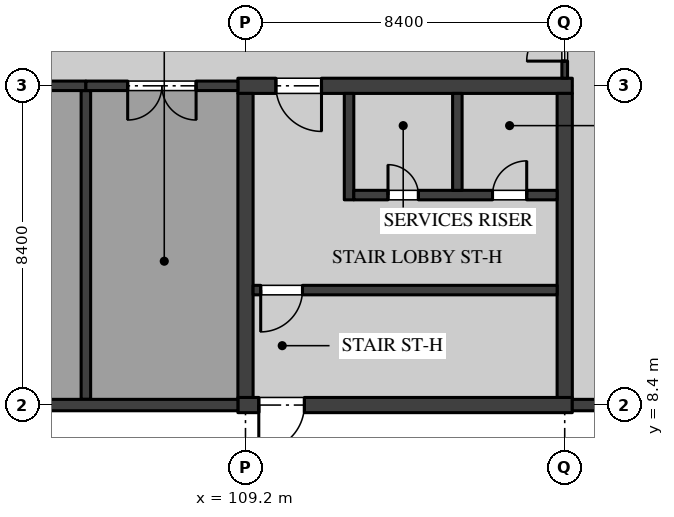
"""IFC4 building model, lengths in metres.
Left out: names, types, materials, properties, quantities, classifications, styles, units other than length and angle.
Written with IfcOpenShell. Run it as: python <this file> out.ifc"""

import sys

from ifc_helpers import new_model, si_unit, direction, frame, frame_2d, origin, place, context, subcontext, project, spatial, rectangle, extrude, element, fill, save


model = new_model("IFC4")
c1 = context("Model", 3, precision=1e-05, world=origin(), true_north=direction((0.0, 1.0)))
c2 = subcontext(c1, "Body", "Model", "MODEL_VIEW")
j1 = project(units=[si_unit("LENGTHUNIT", "METRE"), si_unit("PLANEANGLEUNIT", "RADIAN")], contexts=[c1])
p1 = place(None, origin())
s1 = spatial("IfcSite", under=j1, at=p1, CompositionType="ELEMENT")
p2 = place(p1, origin())
s2 = spatial("IfcBuilding", under=s1, at=p2, CompositionType="ELEMENT")
p3 = place(p2, origin())
s3 = spatial("IfcBuildingStorey", under=s2, at=p3, CompositionType="ELEMENT", Elevation=0.0)
p4 = place(p3, frame((109.0, 8.4, 0.0), z_axis=(0.0, 0.0, 1.0), x_axis=(1.0, 0.0, 0.0)))
e1 = element("IfcWall", 1, at=p4, inside=s3, PredefinedType="SHEAR", context=c2, shape_type="SweptSolid", body=[
    extrude(rectangle(XDim=8.8, YDim=0.4, at=frame_2d((4.4, 0.0))), origin(), (0.0, 0.0, 1.0), 5.05),
])
p5 = place(p4, frame((0.55, 0.0, 0.0)))
e2 = element("IfcOpeningElement", 2, at=p5, cuts=e1, PredefinedType="OPENING", context=c2, shape_type="SweptSolid", body=[
    extrude(rectangle(XDim=1.2, YDim=2.1, at=frame_2d((0.6, 1.05))), frame((0.0, 0.21, 0.0), z_axis=(0.0, -1.0, 0.0), x_axis=(1.0, 0.0, 0.0)), (0.0, 0.0, 1.0), 0.42),
])
p6 = place(p3, frame((109.0, 16.8, 0.0), z_axis=(0.0, 0.0, 1.0), x_axis=(1.0, 0.0, 0.0)))
e3 = element("IfcWall", 3, at=p6, inside=s3, PredefinedType="SHEAR", context=c2, shape_type="SweptSolid", body=[
    extrude(rectangle(XDim=8.8, YDim=0.4, at=frame_2d((4.4, 0.0))), origin(), (0.0, 0.0, 1.0), 5.05),
])
p7 = place(p6, frame((1.0, 0.0, 0.0)))
e4 = element("IfcOpeningElement", 4, at=p7, cuts=e3, PredefinedType="OPENING", context=c2, shape_type="SweptSolid", body=[
    extrude(rectangle(XDim=1.2, YDim=2.1, at=frame_2d((0.6, 1.05))), frame((0.0, 0.21, 0.0), z_axis=(0.0, -1.0, 0.0), x_axis=(1.0, 0.0, 0.0)), (0.0, 0.0, 1.0), 0.42),
])
for number, where, z_axis, x_axis in (
    (5, (109.2, 8.6, 0.0), (0.0, 0.0, 1.0), (0.0, 1.0, 0.0)),
    (6, (117.6, 8.6, 0.0), (0.0, 0.0, 1.0), (0.0, 1.0, 0.0)),
):
    element("IfcWall", number, at=place(p3, frame(where, z_axis=z_axis, x_axis=x_axis)), inside=s3, PredefinedType="SHEAR", context=c2, shape_type="SweptSolid", body=[
        extrude(rectangle(XDim=8.0, YDim=0.4, at=frame_2d((4.0, 0.0))), origin(), (0.0, 0.0, 1.0), 5.05),
    ])
p8 = place(p3, frame((109.4, 11.425, 0.0), z_axis=(0.0, 0.0, 1.0), x_axis=(1.0, 0.0, 0.0)))
e7 = element("IfcWall", 7, at=p8, inside=s3, PredefinedType="SOLIDWALL", context=c2, shape_type="SweptSolid", body=[
    extrude(rectangle(XDim=8.0, YDim=0.25, at=frame_2d((4.0, 0.0))), origin(), (0.0, 0.0, 1.0), 5.05),
])
p9 = place(p8, frame((0.2, 0.0, 0.0)))
e8 = element("IfcOpeningElement", 8, at=p9, cuts=e7, PredefinedType="OPENING", context=c2, shape_type="SweptSolid", body=[
    extrude(rectangle(XDim=1.1, YDim=2.1, at=frame_2d((0.55, 1.05))), frame((0.0, 0.135, 0.0), z_axis=(0.0, -1.0, 0.0), x_axis=(1.0, 0.0, 0.0)), (0.0, 0.0, 1.0), 0.27),
])
p10 = place(p3, frame((111.925, 13.8, 0.0), z_axis=(0.0, 0.0, 1.0), x_axis=(0.0, 1.0, 0.0)))
e9 = element("IfcWall", 9, at=p10, inside=s3, PredefinedType="SOLIDWALL", context=c2, shape_type="SweptSolid", body=[
    extrude(rectangle(XDim=2.8, YDim=0.25, at=frame_2d((1.4, 0.0))), origin(), (0.0, 0.0, 1.0), 5.05),
])
p11 = place(p3, frame((112.05, 13.925, 0.0), z_axis=(0.0, 0.0, 1.0), x_axis=(1.0, 0.0, 0.0)))
e10 = element("IfcWall", 10, at=p11, inside=s3, PredefinedType="SOLIDWALL", context=c2, shape_type="SweptSolid", body=[
    extrude(rectangle(XDim=5.35, YDim=0.25, at=frame_2d((2.675, 0.0))), origin(), (0.0, 0.0, 1.0), 5.05),
])
p12 = place(p11, frame((3.65, 0.0, 0.0)))
e11 = element("IfcOpeningElement", 11, at=p12, cuts=e10, PredefinedType="OPENING", context=c2, shape_type="SweptSolid", body=[
    extrude(rectangle(XDim=0.9, YDim=2.1, at=frame_2d((0.45, 1.05))), frame((0.0, 0.135, 0.0), z_axis=(0.0, -1.0, 0.0), x_axis=(1.0, 0.0, 0.0)), (0.0, 0.0, 1.0), 0.27),
])
p13 = place(p11, frame((0.9, 0.0, 0.0)))
e12 = element("IfcOpeningElement", 12, at=p13, cuts=e10, PredefinedType="OPENING", context=c2, shape_type="SweptSolid", body=[
    extrude(rectangle(XDim=0.8, YDim=2.1, at=frame_2d((0.4, 1.05))), frame((0.0, 0.135, 0.0), z_axis=(0.0, -1.0, 0.0), x_axis=(1.0, 0.0, 0.0)), (0.0, 0.0, 1.0), 0.27),
])
p14 = place(p3, frame((114.775, 14.05, 0.0), z_axis=(0.0, 0.0, 1.0), x_axis=(0.0, 1.0, 0.0)))
e13 = element("IfcWall", 13, at=p14, inside=s3, PredefinedType="SOLIDWALL", context=c2, shape_type="SweptSolid", body=[
    extrude(rectangle(XDim=2.55, YDim=0.25, at=frame_2d((1.275, 0.0))), origin(), (0.0, 0.0, 1.0), 5.05),
])
p15 = place(p3, frame((105.0, 8.55, 0.0), z_axis=(0.0, 0.0, 1.0), x_axis=(0.0, 1.0, 0.0)))
e14 = element("IfcWall", 14, at=p15, inside=s3, PredefinedType="PARTITIONING", context=c2, shape_type="SweptSolid", body=[
    extrude(rectangle(XDim=8.125, YDim=0.25, at=frame_2d((4.062, 0.0))), origin(), (0.0, 0.0, 1.0), 5.05),
])
p16 = place(p3, frame((101.15, 16.8, 0.0), z_axis=(0.0, 0.0, 1.0), x_axis=(1.0, 0.0, 0.0)))
e15 = element("IfcWall", 15, at=p16, inside=s3, PredefinedType="PARTITIONING", context=c2, shape_type="SweptSolid", body=[
    extrude(rectangle(XDim=3.85, YDim=0.25, at=frame_2d((1.925, 0.0))), origin(), (0.0, 0.0, 1.0), 5.05),
])
p17 = place(p3, frame((105.0, 16.8, 0.0), z_axis=(0.0, 0.0, 1.0), x_axis=(1.0, 0.0, 0.0)))
e16 = element("IfcWall", 16, at=p17, inside=s3, PredefinedType="PARTITIONING", context=c2, shape_type="SweptSolid", body=[
    extrude(rectangle(XDim=4.0, YDim=0.25, at=frame_2d((2.0, 0.0))), origin(), (0.0, 0.0, 1.0), 5.05),
])
p18 = place(p17, frame((1.1, 0.0, 0.0)))
e17 = element("IfcOpeningElement", 17, at=p18, cuts=e16, PredefinedType="OPENING", context=c2, shape_type="SweptSolid", body=[
    extrude(rectangle(XDim=1.8, YDim=2.7, at=frame_2d((0.9, 1.35))), frame((0.0, 0.135, 0.0), z_axis=(0.0, -1.0, 0.0), x_axis=(1.0, 0.0, 0.0)), (0.0, 0.0, 1.0), 0.27),
])
p19 = place(p3, frame((117.6, 17.0, 0.0), z_axis=(0.0, 0.0, 1.0), x_axis=(0.0, 1.0, 0.0)))
e18 = element("IfcWall", 18, at=p19, inside=s3, PredefinedType="PARTITIONING", context=c2, shape_type="SweptSolid", body=[
    extrude(rectangle(XDim=1.9, YDim=0.15, at=frame_2d((0.95, 0.0))), origin(), (0.0, 0.0, 1.0), 8.375),
])
p20 = place(p19, frame((0.45, 0.0, 0.0)))
e19 = element("IfcOpeningElement", 19, at=p20, cuts=e18, PredefinedType="OPENING", context=c2, shape_type="SweptSolid", body=[
    extrude(rectangle(XDim=1.0, YDim=2.1, at=frame_2d((0.5, 1.05))), frame((0.0, 0.085, 0.0), z_axis=(0.0, -1.0, 0.0), x_axis=(1.0, 0.0, 0.0)), (0.0, 0.0, 1.0), 0.17),
])
p21 = place(p3, frame((101.13, 8.4, 0.0), z_axis=(0.0, 0.0, 1.0), x_axis=(1.0, 0.0, 0.0)))
e20 = element("IfcWall", 20, at=p21, inside=s3, PredefinedType="SOLIDWALL", context=c2, shape_type="SweptSolid", body=[
    extrude(rectangle(XDim=7.87, YDim=0.3, at=frame_2d((3.935, 0.0))), origin(), (0.0, 0.0, 1.0), 5.05),
])
p22 = place(p3, frame((117.8, 8.4, 0.0), z_axis=(0.0, 0.0, 1.0), x_axis=(1.0, 0.0, 0.0)))
e21 = element("IfcWall", 21, at=p22, inside=s3, PredefinedType="SOLIDWALL", context=c2, shape_type="SweptSolid", body=[
    extrude(rectangle(XDim=7.87, YDim=0.3, at=frame_2d((3.935, 0.0))), origin(), (0.0, 0.0, 1.0), 5.4),
])
p23 = place(p22, frame((5.2, 0.0, 0.0)))
e22 = element("IfcOpeningElement", 22, at=p23, cuts=e21, PredefinedType="OPENING", context=c2, shape_type="SweptSolid", body=[
    extrude(rectangle(XDim=1.8, YDim=2.4, at=frame_2d((0.9, 1.2))), frame((0.0, 0.16, 0.0), z_axis=(0.0, -1.0, 0.0), x_axis=(1.0, 0.0, 0.0)), (0.0, 0.0, 1.0), 0.32),
])
p24 = place(p12, origin())
e23 = element("IfcDoor", 23, at=p24, inside=s3, OperationType="SINGLE_SWING_LEFT", PredefinedType="DOOR", context=c2, shape_type="SweptSolid", body=[
    extrude(rectangle(XDim=0.9, YDim=2.1, at=frame_2d((0.45, 1.05))), frame((0.0, 0.035, 0.0), z_axis=(0.0, -1.0, 0.0), x_axis=(1.0, 0.0, 0.0)), (0.0, 0.0, 1.0), 0.07),
])
fill(e11, e23)
p25 = place(p7, frame((1.2, 0.0, 0.0), z_axis=(0.0, 0.0, 1.0), x_axis=(-1.0, 0.0, 0.0)))
e24 = element("IfcDoor", 24, at=p25, inside=s3, OperationType="SINGLE_SWING_RIGHT", PredefinedType="DOOR", context=c2, shape_type="SweptSolid", body=[
    extrude(rectangle(XDim=1.2, YDim=2.1, at=frame_2d((0.6, 1.05))), frame((0.0, 0.035, 0.0), z_axis=(0.0, -1.0, 0.0), x_axis=(1.0, 0.0, 0.0)), (0.0, 0.0, 1.0), 0.07),
])
fill(e4, e24)
p26 = place(p13, origin())
e25 = element("IfcDoor", 25, at=p26, inside=s3, OperationType="SINGLE_SWING_RIGHT", PredefinedType="DOOR", context=c2, shape_type="SweptSolid", body=[
    extrude(rectangle(XDim=0.8, YDim=2.1, at=frame_2d((0.4, 1.05))), frame((0.0, 0.035, 0.0), z_axis=(0.0, -1.0, 0.0), x_axis=(1.0, 0.0, 0.0)), (0.0, 0.0, 1.0), 0.07),
])
fill(e12, e25)
p27 = place(p9, frame((1.1, 0.0, 0.0), z_axis=(0.0, 0.0, 1.0), x_axis=(-1.0, 0.0, 0.0)))
e26 = element("IfcDoor", 26, at=p27, inside=s3, OperationType="SINGLE_SWING_LEFT", PredefinedType="DOOR", context=c2, shape_type="SweptSolid", body=[
    extrude(rectangle(XDim=1.1, YDim=2.1, at=frame_2d((0.55, 1.05))), frame((0.0, 0.035, 0.0), z_axis=(0.0, -1.0, 0.0), x_axis=(1.0, 0.0, 0.0)), (0.0, 0.0, 1.0), 0.07),
])
fill(e8, e26)
p28 = place(p5, frame((1.2, 0.0, 0.0), z_axis=(0.0, 0.0, 1.0), x_axis=(-1.0, 0.0, 0.0)))
e27 = element("IfcDoor", 27, at=p28, inside=s3, OperationType="SINGLE_SWING_LEFT", PredefinedType="DOOR", context=c2, shape_type="SweptSolid", body=[
    extrude(rectangle(XDim=1.2, YDim=2.1, at=frame_2d((0.6, 1.05))), frame((0.0, 0.035, 0.0), z_axis=(0.0, -1.0, 0.0), x_axis=(1.0, 0.0, 0.0)), (0.0, 0.0, 1.0), 0.07),
])
fill(e2, e27)
p29 = place(p18, frame((1.8, 0.0, 0.0), z_axis=(0.0, 0.0, 1.0), x_axis=(-1.0, 0.0, 0.0)))
e28 = element("IfcDoor", 28, at=p29, inside=s3, OperationType="DOUBLE_DOOR_SINGLE_SWING", PredefinedType="DOOR", context=c2, shape_type="SweptSolid", body=[
    extrude(rectangle(XDim=1.8, YDim=2.7, at=frame_2d((0.9, 1.35))), frame((0.0, 0.05, 0.0), z_axis=(0.0, -1.0, 0.0), x_axis=(1.0, 0.0, 0.0)), (0.0, 0.0, 1.0), 0.1),
])
fill(e17, e28)
p30 = place(p20, origin())
e29 = element("IfcDoor", 29, at=p30, inside=s3, OperationType="SINGLE_SWING_RIGHT", PredefinedType="DOOR", context=c2, shape_type="SweptSolid", body=[
    extrude(rectangle(XDim=1.0, YDim=2.1, at=frame_2d((0.5, 1.05))), frame((0.0, 0.025, 0.0), z_axis=(0.0, -1.0, 0.0), x_axis=(1.0, 0.0, 0.0)), (0.0, 0.0, 1.0), 0.05),
])
fill(e19, e29)
save(model, sys.argv[1])
